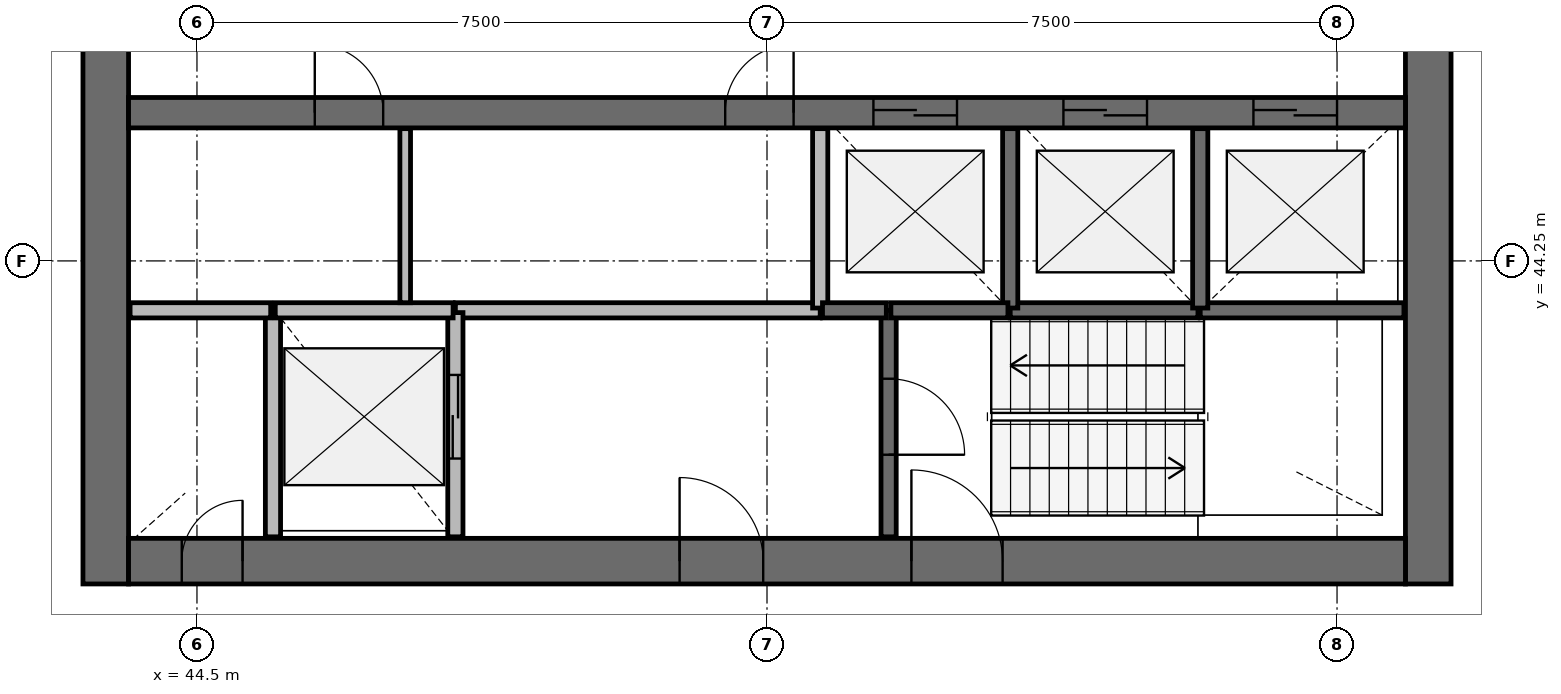
"""IFC4 building model, lengths in metres.
Left out: names, types, materials, properties, quantities, classifications, styles, units other than length and angle.
Written with IfcOpenShell. Run it as: python <this file> out.ifc"""

import sys

from ifc_helpers import new_model, si_unit, direction, frame, frame_2d, origin, place, context, subcontext, project, spatial, rectangle, extrude, source, transform, mapped, element, fill, save


model = new_model("IFC4")
c1 = context("Model", 3, precision=1e-05, world=origin(), true_north=direction((0.0, 1.0)))
c2 = subcontext(c1, "Body", "Model", "MODEL_VIEW")
j1 = project(units=[si_unit("LENGTHUNIT", "METRE"), si_unit("PLANEANGLEUNIT", "RADIAN")], contexts=[c1])
p1 = place(None, origin())
s1 = spatial("IfcSite", under=j1, at=p1, CompositionType="ELEMENT")
p2 = place(p1, origin())
s2 = spatial("IfcBuilding", under=s1, at=p2, CompositionType="ELEMENT")
p3 = place(p2, frame((0.0, 0.0, 222.8)))
s3 = spatial("IfcBuildingStorey", under=s2, at=p3, CompositionType="ELEMENT", Elevation=222.8)
p4 = place(p3, frame((60.7, 40.0, 0.0), z_axis=(0.0, 0.0, 1.0), x_axis=(0.0, 1.0, 0.0)))
e1 = element("IfcWall", 1, at=p4, inside=s3, PredefinedType="SHEAR", context=c2, shape_type="SweptSolid", body=[
    extrude(rectangle(XDim=16.0, YDim=0.6, at=frame_2d((8.0, 0.0))), origin(), (0.0, 0.0, 1.0), 3.9),
])
p5 = place(p4, frame((7.1, 0.0, 0.0)))
e2 = element("IfcOpeningElement", 2, at=p5, cuts=e1, PredefinedType="OPENING", context=c2, shape_type="SweptSolid", body=[
    extrude(rectangle(XDim=1.8, YDim=2.1, at=frame_2d((0.9, 1.05))), frame((0.0, 0.31, 0.0), z_axis=(0.0, -1.0, 0.0), x_axis=(1.0, 0.0, 0.0)), (0.0, 0.0, 1.0), 0.62),
])
p6 = place(p3, frame((43.3, 56.0, 0.0), z_axis=(0.0, 0.0, 1.0), x_axis=(0.0, -1.0, 0.0)))
e3 = element("IfcWall", 3, at=p6, inside=s3, PredefinedType="SHEAR", context=c2, shape_type="SweptSolid", body=[
    extrude(rectangle(XDim=16.0, YDim=0.6, at=frame_2d((8.0, 0.0))), origin(), (0.0, 0.0, 1.0), 3.9),
])
p7 = place(p6, frame((7.1, 0.0, 0.0)))
e4 = element("IfcOpeningElement", 4, at=p7, cuts=e3, PredefinedType="OPENING", context=c2, shape_type="SweptSolid", body=[
    extrude(rectangle(XDim=1.8, YDim=2.1, at=frame_2d((0.9, 1.05))), frame((0.0, 0.31, 0.0), z_axis=(0.0, -1.0, 0.0), x_axis=(1.0, 0.0, 0.0)), (0.0, 0.0, 1.0), 0.62),
])
p8 = place(p3, frame((43.6, 40.3, 0.0), z_axis=(0.0, 0.0, 1.0), x_axis=(1.0, 0.0, 0.0)))
e5 = element("IfcWall", 5, at=p8, inside=s3, PredefinedType="SHEAR", context=c2, shape_type="SweptSolid", body=[
    extrude(rectangle(XDim=16.8, YDim=0.6, at=frame_2d((8.4, 0.0))), origin(), (0.0, 0.0, 1.0), 3.9),
])
p9 = place(p8, frame((10.3, 0.0, 0.0)))
e6 = element("IfcOpeningElement", 6, at=p9, cuts=e5, PredefinedType="OPENING", context=c2, shape_type="SweptSolid", body=[
    extrude(rectangle(XDim=1.2, YDim=2.1, at=frame_2d((0.6, 1.05))), frame((0.0, 0.31, 0.0), z_axis=(0.0, -1.0, 0.0), x_axis=(1.0, 0.0, 0.0)), (0.0, 0.0, 1.0), 0.62),
])
p10 = place(p8, frame((7.25, 0.0, 0.0)))
e7 = element("IfcOpeningElement", 7, at=p10, cuts=e5, PredefinedType="OPENING", context=c2, shape_type="SweptSolid", body=[
    extrude(rectangle(XDim=1.1, YDim=2.1, at=frame_2d((0.55, 1.05))), frame((0.0, 0.31, 0.0), z_axis=(0.0, -1.0, 0.0), x_axis=(1.0, 0.0, 0.0)), (0.0, 0.0, 1.0), 0.62),
])
p11 = place(p8, frame((0.7, 0.0, 0.0)))
e8 = element("IfcOpeningElement", 8, at=p11, cuts=e5, PredefinedType="OPENING", context=c2, shape_type="SweptSolid", body=[
    extrude(rectangle(XDim=0.8, YDim=2.1, at=frame_2d((0.4, 1.05))), frame((0.0, 0.31, 0.0), z_axis=(0.0, -1.0, 0.0), x_axis=(1.0, 0.0, 0.0)), (0.0, 0.0, 1.0), 0.62),
])
p12 = place(p3, frame((43.6, 46.2, 0.0), z_axis=(0.0, 0.0, 1.0), x_axis=(1.0, 0.0, 0.0)))
e9 = element("IfcWall", 9, at=p12, inside=s3, PredefinedType="SHEAR", context=c2, shape_type="SweptSolid", body=[
    extrude(rectangle(XDim=16.8, YDim=0.4, at=frame_2d((8.4, 0.0))), origin(), (0.0, 0.0, 1.0), 3.9),
])
p13 = place(p12, frame((9.8, 0.0, 0.0)))
e10 = element("IfcOpeningElement", 10, at=p13, cuts=e9, PredefinedType="OPENING", context=c2, shape_type="SweptSolid", body=[
    extrude(rectangle(XDim=1.1, YDim=2.1, at=frame_2d((0.55, 1.05))), frame((0.0, 0.21, 0.0), z_axis=(0.0, -1.0, 0.0), x_axis=(1.0, 0.0, 0.0)), (0.0, 0.0, 1.0), 0.42),
])
p14 = place(p12, frame((12.3, 0.0, 0.0)))
e11 = element("IfcOpeningElement", 11, at=p14, cuts=e9, PredefinedType="OPENING", context=c2, shape_type="SweptSolid", body=[
    extrude(rectangle(XDim=1.1, YDim=2.1, at=frame_2d((0.55, 1.05))), frame((0.0, 0.21, 0.0), z_axis=(0.0, -1.0, 0.0), x_axis=(1.0, 0.0, 0.0)), (0.0, 0.0, 1.0), 0.42),
])
p15 = place(p12, frame((14.8, 0.0, 0.0)))
e12 = element("IfcOpeningElement", 12, at=p15, cuts=e9, PredefinedType="OPENING", context=c2, shape_type="SweptSolid", body=[
    extrude(rectangle(XDim=1.1, YDim=2.1, at=frame_2d((0.55, 1.05))), frame((0.0, 0.21, 0.0), z_axis=(0.0, -1.0, 0.0), x_axis=(1.0, 0.0, 0.0)), (0.0, 0.0, 1.0), 0.42),
])
p16 = place(p12, frame((2.45, 0.0, 0.0)))
e13 = element("IfcOpeningElement", 13, at=p16, cuts=e9, PredefinedType="OPENING", context=c2, shape_type="SweptSolid", body=[
    extrude(rectangle(XDim=0.9, YDim=2.1, at=frame_2d((0.45, 1.05))), frame((0.0, 0.21, 0.0), z_axis=(0.0, -1.0, 0.0), x_axis=(1.0, 0.0, 0.0)), (0.0, 0.0, 1.0), 0.42),
])
p17 = place(p12, frame((7.85, 0.0, 0.0)))
e14 = element("IfcOpeningElement", 14, at=p17, cuts=e9, PredefinedType="OPENING", context=c2, shape_type="SweptSolid", body=[
    extrude(rectangle(XDim=0.9, YDim=2.1, at=frame_2d((0.45, 1.05))), frame((0.0, 0.21, 0.0), z_axis=(0.0, -1.0, 0.0), x_axis=(1.0, 0.0, 0.0)), (0.0, 0.0, 1.0), 0.42),
])
p18 = place(p3, frame((52.7, 43.6, 0.0), z_axis=(0.0, 0.0, 1.0), x_axis=(-1.0, 0.0, 0.0)))
e15 = element("IfcWall", 15, at=p18, inside=s3, PredefinedType="SOLIDWALL", context=c2, shape_type="SweptSolid", body=[
    extrude(rectangle(XDim=4.8, YDim=0.2, at=frame_2d((2.4, 0.0))), origin(), (0.0, 0.0, 1.0), 3.58),
])
p19 = place(p3, frame((45.5, 43.6, 0.0), z_axis=(0.0, 0.0, 1.0), x_axis=(0.0, -1.0, 0.0)))
e16 = element("IfcWall", 16, at=p19, inside=s3, PredefinedType="SOLIDWALL", context=c2, shape_type="SweptSolid", body=[
    extrude(rectangle(XDim=2.98, YDim=0.2, at=frame_2d((1.49, 0.0))), origin(), (0.0, 0.0, 1.0), 3.58),
])
p20 = place(p3, frame((47.9, 40.62, 0.0), z_axis=(0.0, 0.0, 1.0), x_axis=(0.0, 1.0, 0.0)))
e17 = element("IfcWall", 17, at=p20, inside=s3, PredefinedType="SOLIDWALL", context=c2, shape_type="SweptSolid", body=[
    extrude(rectangle(XDim=2.95, YDim=0.2, at=frame_2d((1.475, 0.0))), origin(), (0.0, 0.0, 1.0), 3.58),
])
p21 = place(p20, frame((1.03, 0.0, 0.0)))
e18 = element("IfcOpeningElement", 18, at=p21, cuts=e17, PredefinedType="OPENING", context=c2, shape_type="SweptSolid", body=[
    extrude(rectangle(XDim=1.1, YDim=2.1, at=frame_2d((0.55, 1.05))), frame((0.0, 0.11, 0.0), z_axis=(0.0, -1.0, 0.0), x_axis=(1.0, 0.0, 0.0)), (0.0, 0.0, 1.0), 0.22),
])
p22 = place(p3, frame((53.6, 43.6, 0.0), z_axis=(0.0, 0.0, 1.0), x_axis=(0.0, -1.0, 0.0)))
e19 = element("IfcWall", 19, at=p22, inside=s3, PredefinedType="SOLIDWALL", context=c2, shape_type="SweptSolid", body=[
    extrude(rectangle(XDim=2.98, YDim=0.2, at=frame_2d((1.49, 0.0))), origin(), (0.0, 0.0, 1.0), 3.58),
])
p23 = place(p22, frame((0.9, 0.0, 0.0)))
e20 = element("IfcOpeningElement", 20, at=p23, cuts=e19, PredefinedType="OPENING", context=c2, shape_type="SweptSolid", body=[
    extrude(rectangle(XDim=1.0, YDim=2.1, at=frame_2d((0.5, 1.05))), frame((0.0, 0.11, 0.0), z_axis=(0.0, -1.0, 0.0), x_axis=(1.0, 0.0, 0.0)), (0.0, 0.0, 1.0), 0.22),
])
p24 = place(p3, frame((57.7, 43.6, 0.0), z_axis=(0.0, 0.0, 1.0), x_axis=(1.0, 0.0, 0.0)))
e21 = element("IfcWall", 21, at=p24, inside=s3, PredefinedType="SOLIDWALL", context=c2, shape_type="SweptSolid", body=[
    extrude(rectangle(XDim=2.68, YDim=0.2, at=frame_2d((1.34, 0.0))), origin(), (0.0, 0.0, 1.0), 3.58),
])
p25 = place(p3, frame((55.2, 43.6, 0.0), z_axis=(0.0, 0.0, 1.0), x_axis=(1.0, 0.0, 0.0)))
e22 = element("IfcWall", 22, at=p25, inside=s3, PredefinedType="SOLIDWALL", context=c2, shape_type="SweptSolid", body=[
    extrude(rectangle(XDim=2.47, YDim=0.2, at=frame_2d((1.235, 0.0))), origin(), (0.0, 0.0, 1.0), 3.58),
])
p26 = place(p3, frame((47.87, 43.6, 0.0), z_axis=(0.0, 0.0, 1.0), x_axis=(-1.0, 0.0, 0.0)))
e23 = element("IfcWall", 23, at=p26, inside=s3, PredefinedType="SOLIDWALL", context=c2, shape_type="SweptSolid", body=[
    extrude(rectangle(XDim=2.34, YDim=0.2, at=frame_2d((1.17, 0.0))), origin(), (0.0, 0.0, 1.0), 3.58),
])
for number, where, z_axis, x_axis in (
    (24, (52.7, 45.99, 0.0), (0.0, 0.0, 1.0), (0.0, -1.0, 0.0)),
    (25, (55.2, 43.63, 0.0), (0.0, 0.0, 1.0), (0.0, 1.0, 0.0)),
    (26, (57.7, 43.63, 0.0), (0.0, 0.0, 1.0), (0.0, 1.0, 0.0)),
):
    element("IfcWall", number, at=place(p3, frame(where, z_axis=z_axis, x_axis=x_axis)), inside=s3, PredefinedType="SOLIDWALL", context=c2, shape_type="SweptSolid", body=[
        extrude(rectangle(XDim=2.36, YDim=0.2, at=frame_2d((1.18, 0.0))), origin(), (0.0, 0.0, 1.0), 3.58),
    ])
p27 = place(p3, frame((45.47, 43.6, 0.0), z_axis=(0.0, 0.0, 1.0), x_axis=(-1.0, 0.0, 0.0)))
e27 = element("IfcWall", 27, at=p27, inside=s3, PredefinedType="SOLIDWALL", context=c2, shape_type="SweptSolid", body=[
    extrude(rectangle(XDim=1.85, YDim=0.2, at=frame_2d((0.925, 0.0))), origin(), (0.0, 0.0, 1.0), 3.58),
])
p28 = place(p3, frame((53.63, 43.6, 0.0), z_axis=(0.0, 0.0, 1.0), x_axis=(1.0, 0.0, 0.0)))
e28 = element("IfcWall", 28, at=p28, inside=s3, PredefinedType="SOLIDWALL", context=c2, shape_type="SweptSolid", body=[
    extrude(rectangle(XDim=1.54, YDim=0.2, at=frame_2d((0.77, 0.0))), origin(), (0.0, 0.0, 1.0), 3.58),
])
p29 = place(p3, frame((52.73, 43.6, 0.0), z_axis=(0.0, 0.0, 1.0), x_axis=(1.0, 0.0, 0.0)))
e29 = element("IfcWall", 29, at=p29, inside=s3, PredefinedType="SOLIDWALL", context=c2, shape_type="SweptSolid", body=[
    extrude(rectangle(XDim=0.84, YDim=0.2, at=frame_2d((0.42, 0.0))), origin(), (0.0, 0.0, 1.0), 3.58),
])
p30 = place(p3, frame((47.24, 43.7, 0.0), z_axis=(0.0, 0.0, 1.0), x_axis=(0.0, 1.0, 0.0)))
e30 = element("IfcWall", 30, at=p30, inside=s3, PredefinedType="PARTITIONING", context=c2, shape_type="SweptSolid", body=[
    extrude(rectangle(XDim=2.29, YDim=0.14, at=frame_2d((1.145, 0.0))), origin(), (0.0, 0.0, 1.0), 2.88),
])
m1 = source(origin(), c2, "Body", "SweptSolid", [
    extrude(rectangle(XDim=1.1, YDim=2.1, at=frame_2d((0.55, 1.05))), frame((0.0, 0.025, 0.0), z_axis=(0.0, -1.0, 0.0), x_axis=(1.0, 0.0, 0.0)), (0.0, 0.0, 1.0), 0.05),
])
p31 = place(p13, origin())
e31 = element("IfcDoor", 31, at=p31, inside=s3, OperationType="DOUBLE_DOOR_SLIDING", PredefinedType="USERDEFINED", context=c2, shape_type="MappedRepresentation", body=[
    mapped(m1, transform((0.0, 0.0, 0.0), scale=1.0)),
])
fill(e10, e31)
p32 = place(p14, origin())
e32 = element("IfcDoor", 32, at=p32, inside=s3, OperationType="DOUBLE_DOOR_SLIDING", PredefinedType="USERDEFINED", context=c2, shape_type="MappedRepresentation", body=[
    mapped(m1, transform((0.0, 0.0, 0.0), scale=1.0)),
])
fill(e11, e32)
p33 = place(p15, origin())
e33 = element("IfcDoor", 33, at=p33, inside=s3, OperationType="DOUBLE_DOOR_SLIDING", PredefinedType="USERDEFINED", context=c2, shape_type="MappedRepresentation", body=[
    mapped(m1, transform((0.0, 0.0, 0.0), scale=1.0)),
])
fill(e12, e33)
p34 = place(p21, origin())
e34 = element("IfcDoor", 34, at=p34, inside=s3, OperationType="DOUBLE_DOOR_SLIDING", PredefinedType="USERDEFINED", context=c2, shape_type="MappedRepresentation", body=[
    mapped(m1, transform((0.0, 0.0, 0.0), scale=1.0)),
])
fill(e18, e34)
m2 = source(origin(), c2, "Body", "SweptSolid", [
    extrude(rectangle(XDim=1.2, YDim=2.1, at=frame_2d((0.6, 1.05))), frame((0.0, 0.025, 0.0), z_axis=(0.0, -1.0, 0.0), x_axis=(1.0, 0.0, 0.0)), (0.0, 0.0, 1.0), 0.05),
])
p35 = place(p9, origin())
e35 = element("IfcDoor", 35, at=p35, inside=s3, OperationType="SINGLE_SWING_LEFT", PredefinedType="DOOR", context=c2, shape_type="MappedRepresentation", body=[
    mapped(m2, transform((0.0, 0.0, 0.0), scale=1.0)),
])
fill(e6, e35)
m3 = source(origin(), c2, "Body", "SweptSolid", [
    extrude(rectangle(XDim=1.0, YDim=2.1, at=frame_2d((0.5, 1.05))), frame((0.0, 0.025, 0.0), z_axis=(0.0, -1.0, 0.0), x_axis=(1.0, 0.0, 0.0)), (0.0, 0.0, 1.0), 0.05),
])
p36 = place(p23, origin())
e36 = element("IfcDoor", 36, at=p36, inside=s3, OperationType="SINGLE_SWING_RIGHT", PredefinedType="DOOR", context=c2, shape_type="MappedRepresentation", body=[
    mapped(m3, transform((0.0, 0.0, 0.0), scale=1.0)),
])
fill(e20, e36)
m4 = source(origin(), c2, "Body", "SweptSolid", [
    extrude(rectangle(XDim=1.1, YDim=2.1, at=frame_2d((0.55, 1.05))), frame((0.0, 0.025, 0.0), z_axis=(0.0, -1.0, 0.0), x_axis=(1.0, 0.0, 0.0)), (0.0, 0.0, 1.0), 0.05),
])
p37 = place(p10, origin())
e37 = element("IfcDoor", 37, at=p37, inside=s3, OperationType="SINGLE_SWING_LEFT", PredefinedType="DOOR", context=c2, shape_type="MappedRepresentation", body=[
    mapped(m4, transform((0.0, 0.0, 0.0), scale=1.0)),
])
fill(e7, e37)
m5 = source(origin(), c2, "Body", "SweptSolid", [
    extrude(rectangle(XDim=0.8, YDim=2.1, at=frame_2d((0.4, 1.05))), frame((0.0, 0.025, 0.0), z_axis=(0.0, -1.0, 0.0), x_axis=(1.0, 0.0, 0.0)), (0.0, 0.0, 1.0), 0.05),
])
p38 = place(p11, origin())
e38 = element("IfcDoor", 38, at=p38, inside=s3, OperationType="SINGLE_SWING_RIGHT", PredefinedType="DOOR", context=c2, shape_type="MappedRepresentation", body=[
    mapped(m5, transform((0.0, 0.0, 0.0), scale=1.0)),
])
fill(e8, e38)
m6 = source(origin(), c2, "Body", "SweptSolid", [
    extrude(rectangle(XDim=0.9, YDim=2.1, at=frame_2d((0.45, 1.05))), frame((0.0, 0.025, 0.0), z_axis=(0.0, -1.0, 0.0), x_axis=(1.0, 0.0, 0.0)), (0.0, 0.0, 1.0), 0.05),
])
p39 = place(p16, origin())
e39 = element("IfcDoor", 39, at=p39, inside=s3, OperationType="SINGLE_SWING_LEFT", PredefinedType="DOOR", context=c2, shape_type="MappedRepresentation", body=[
    mapped(m6, transform((0.0, 0.0, 0.0), scale=1.0)),
])
fill(e13, e39)
p40 = place(p17, origin())
e40 = element("IfcDoor", 40, at=p40, inside=s3, OperationType="SINGLE_SWING_RIGHT", PredefinedType="DOOR", context=c2, shape_type="MappedRepresentation", body=[
    mapped(m6, transform((0.0, 0.0, 0.0), scale=1.0)),
])
fill(e14, e40)
save(model, sys.argv[1])
